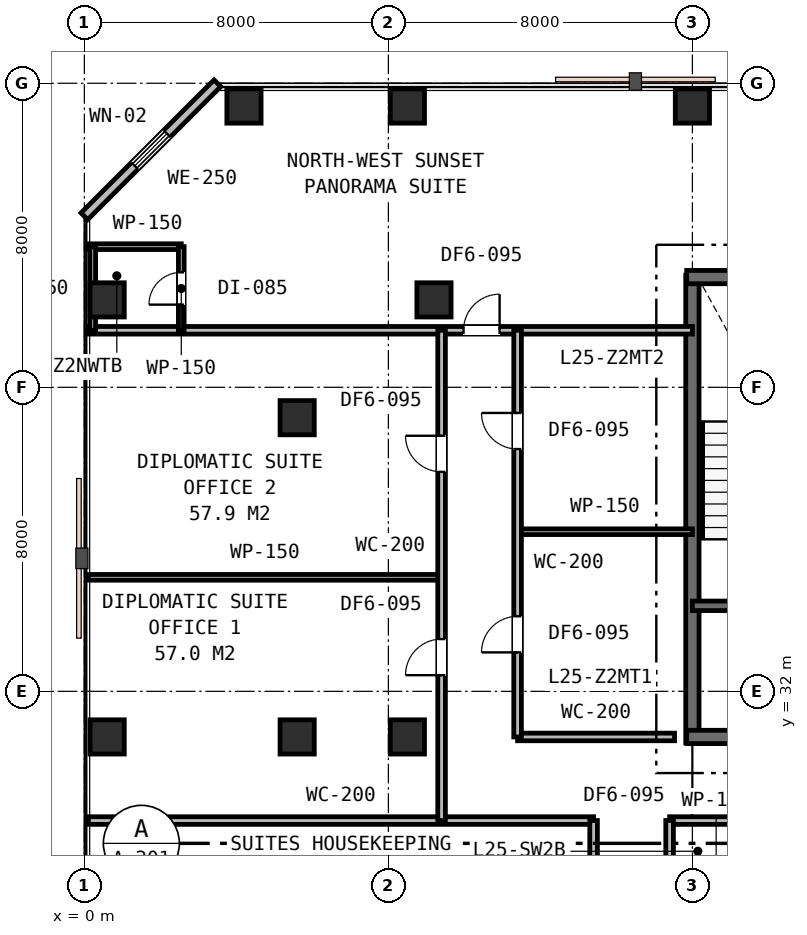
"""IFC4 building model, lengths in metres.
Left out: names, types, materials, properties, quantities, classifications, styles, units other than length and angle.
Written with IfcOpenShell. Run it as: python <this file> out.ifc"""

import sys

from ifc_helpers import new_model, si_unit, direction, frame, frame_2d, origin, origin_2d, place, context, subcontext, project, spatial, rectangle, extrude, element, fill, save


model = new_model("IFC4")
c1 = context("Model", 3, precision=1e-05, world=origin(), true_north=direction((0.0, 1.0)))
c2 = subcontext(c1, "Body", "Model", "MODEL_VIEW")
j1 = project(units=[si_unit("LENGTHUNIT", "METRE"), si_unit("PLANEANGLEUNIT", "RADIAN")], contexts=[c1])
p1 = place(None, origin())
s1 = spatial("IfcSite", under=j1, at=p1, CompositionType="ELEMENT")
p2 = place(p1, origin())
s2 = spatial("IfcBuilding", under=s1, at=p2, CompositionType="ELEMENT")
p3 = place(p2, frame((0.0, 0.0, 100.8)))
s3 = spatial("IfcBuildingStorey", under=s2, at=p3, CompositionType="ELEMENT", Elevation=100.8)
p4 = place(p3, frame((16.0, 30.65, 0.0), z_axis=(0.0, 0.0, 1.0), x_axis=(0.0, 1.0, 0.0)))
e1 = element("IfcWall", 1, at=p4, inside=s3, PredefinedType="SHEAR", context=c2, shape_type="SweptSolid", body=[
    extrude(rectangle(XDim=12.3, YDim=0.35, at=frame_2d((6.15, 0.0))), origin(), (0.0, 0.0, 1.0), 3.6),
])
p5 = place(p3, frame((15.85, 42.9, 0.0), z_axis=(0.0, 0.0, 1.0), x_axis=(1.0, 0.0, 0.0)))
e2 = element("IfcWall", 2, at=p5, inside=s3, PredefinedType="SHEAR", context=c2, shape_type="SweptSolid", body=[
    extrude(rectangle(XDim=24.3, YDim=0.35, at=frame_2d((12.15, 0.0))), origin(), (0.0, 0.0, 1.0), 3.6),
])
p6 = place(p3, frame((15.85, 30.8, 0.0), z_axis=(0.0, 0.0, 1.0), x_axis=(1.0, 0.0, 0.0)))
e3 = element("IfcWall", 3, at=p6, inside=s3, PredefinedType="SHEAR", context=c2, shape_type="SweptSolid", body=[
    extrude(rectangle(XDim=11.2, YDim=0.35, at=frame_2d((5.6, 0.0))), origin(), (0.0, 0.0, 1.0), 3.6),
])
p7 = place(p6, frame((2.45, 0.0, 0.0)))
e4 = element("IfcOpeningElement", 4, at=p7, cuts=e3, PredefinedType="OPENING", context=c2, shape_type="SweptSolid", body=[
    extrude(rectangle(XDim=1.1, YDim=2.15, at=frame_2d((0.55, 1.075))), frame((0.0, 0.185, 0.0), z_axis=(0.0, -1.0, 0.0), x_axis=(1.0, 0.0, 0.0)), (0.0, 0.0, 1.0), 0.37),
])
p8 = place(p3, frame((16.0, 34.25, 0.0), z_axis=(0.0, 0.0, 1.0), x_axis=(1.0, 0.0, 0.0)))
e5 = element("IfcWall", 5, at=p8, inside=s3, PredefinedType="SHEAR", context=c2, shape_type="SweptSolid", body=[
    extrude(rectangle(XDim=6.05, YDim=0.25, at=frame_2d((3.025, 0.0))), origin(), (0.0, 0.0, 1.0), 3.6),
])
p9 = place(p8, frame((1.25, 0.0, 0.0)))
e6 = element("IfcOpeningElement", 6, at=p9, cuts=e5, PredefinedType="OPENING", context=c2, shape_type="SweptSolid", body=[
    extrude(rectangle(XDim=1.0, YDim=2.15, at=frame_2d((0.5, 1.075))), frame((0.0, 0.135, 0.0), z_axis=(0.0, -1.0, 0.0), x_axis=(1.0, 0.0, 0.0)), (0.0, 0.0, 1.0), 0.27),
])
p10 = place(p8, frame((4.2, 0.0, 0.0)))
e7 = element("IfcOpeningElement", 7, at=p10, cuts=e5, PredefinedType="OPENING", context=c2, shape_type="SweptSolid", body=[
    extrude(rectangle(XDim=1.1, YDim=2.15, at=frame_2d((0.55, 1.075))), frame((0.0, 0.135, 0.0), z_axis=(0.0, -1.0, 0.0), x_axis=(1.0, 0.0, 0.0)), (0.0, 0.0, 1.0), 0.27),
])
for number, where, z_axis, x_axis in (
    (8, (5.6, 30.8, 0.0), (0.0, 0.0, 1.0), (1.0, 0.0, 0.0)),
    (9, (5.6, 39.2, 0.0), (0.0, 0.0, 1.0), (1.0, 0.0, 0.0)),
    (10, (8.5, 30.8, 0.0), (0.0, 0.0, 1.0), (1.0, 0.0, 0.0)),
    (11, (9.2, 42.3, 0.0), (0.0, 0.0, 1.0), (1.0, 0.0, 0.0)),
    (12, (0.6, 30.8, 0.0), (0.0, 0.0, 1.0), (1.0, 0.0, 0.0)),
    (13, (0.6, 42.3, 0.0), (0.0, 0.0, 1.0), (1.0, 0.0, 0.0)),
    (14, (4.2, 47.4, 0.0), (0.0, 0.0, 1.0), (1.0, 0.0, 0.0)),
    (15, (8.5, 47.4, 0.0), (0.0, 0.0, 1.0), (1.0, 0.0, 0.0)),
    (16, (16.0, 47.4, 0.0), (0.0, 0.0, 1.0), (1.0, 0.0, 0.0)),
):
    element("IfcColumn", number, at=place(p3, frame(where, z_axis=z_axis, x_axis=x_axis)), inside=s3, PredefinedType="COLUMN", context=c2, shape_type="SweptSolid", body=[
        extrude(rectangle(XDim=0.9, YDim=0.9, at=origin_2d()), origin(), (0.0, 0.0, 1.0), 3.6),
    ])
p11 = place(p3, frame((3.5, 48.0, 0.0), z_axis=(0.0, 0.0, 1.0), x_axis=(-0.707106781187, -0.707106781187, 0.0)))
e17 = element("IfcWall", 17, at=p11, inside=s3, PredefinedType="STANDARD", context=c2, shape_type="SweptSolid", body=[
    extrude(rectangle(XDim=4.95, YDim=0.25, at=frame_2d((2.475, 0.0))), origin(), (0.0, 0.0, 1.0), 3.33),
])
p12 = place(p11, frame((1.875, 0.0, 0.85)))
e18 = element("IfcOpeningElement", 18, at=p12, cuts=e17, PredefinedType="OPENING", context=c2, shape_type="SweptSolid", body=[
    extrude(rectangle(XDim=1.2, YDim=1.6, at=frame_2d((0.6, 0.8))), frame((0.0, 0.135, 0.0), z_axis=(0.0, -1.0, 0.0), x_axis=(1.0, 0.0, 0.0)), (0.0, 0.0, 1.0), 0.27),
])
p13 = place(p3, frame((0.1, 28.6, 0.0), z_axis=(0.0, 0.0, 1.0), x_axis=(1.0, 0.0, 0.0)))
e19 = element("IfcWall", 19, at=p13, inside=s3, PredefinedType="PARTITIONING", context=c2, shape_type="SweptSolid", body=[
    extrude(rectangle(XDim=13.3, YDim=0.2, at=frame_2d((6.65, 0.0))), origin(), (0.0, 0.0, 1.0), 2.87),
])
p14 = place(p3, frame((15.4, 28.6, 0.0), z_axis=(0.0, 0.0, 1.0), x_axis=(1.0, 0.0, 0.0)))
e20 = element("IfcWall", 20, at=p14, inside=s3, PredefinedType="PARTITIONING", context=c2, shape_type="SweptSolid", body=[
    extrude(rectangle(XDim=28.8, YDim=0.2, at=frame_2d((14.4, 0.0))), origin(), (0.0, 0.0, 1.0), 2.87),
])
p15 = place(p14, frame((12.41, 0.0, 0.0)))
e21 = element("IfcOpeningElement", 21, at=p15, cuts=e20, PredefinedType="OPENING", context=c2, shape_type="SweptSolid", body=[
    extrude(rectangle(XDim=0.95, YDim=2.15, at=frame_2d((0.475, 1.075))), frame((0.0, 0.11, 0.0), z_axis=(0.0, -1.0, 0.0), x_axis=(1.0, 0.0, 0.0)), (0.0, 0.0, 1.0), 0.22),
])
p16 = place(p14, frame((22.68, 0.0, 0.0)))
e22 = element("IfcOpeningElement", 22, at=p16, cuts=e20, PredefinedType="OPENING", context=c2, shape_type="SweptSolid", body=[
    extrude(rectangle(XDim=0.95, YDim=2.15, at=frame_2d((0.475, 1.075))), frame((0.0, 0.11, 0.0), z_axis=(0.0, -1.0, 0.0), x_axis=(1.0, 0.0, 0.0)), (0.0, 0.0, 1.0), 0.22),
])
p17 = place(p3, frame((11.4, 30.8, 0.0), z_axis=(0.0, 0.0, 1.0), x_axis=(1.0, 0.0, 0.0)))
e23 = element("IfcWall", 23, at=p17, inside=s3, PredefinedType="PARTITIONING", context=c2, shape_type="SweptSolid", body=[
    extrude(rectangle(XDim=4.13, YDim=0.2, at=frame_2d((2.065, 0.0))), origin(), (0.0, 0.0, 1.0), 2.87),
])
p18 = place(p3, frame((13.4, 10.6, 0.0), z_axis=(0.0, 0.0, 1.0), x_axis=(0.0, 1.0, 0.0)))
e24 = element("IfcWall", 24, at=p18, inside=s3, PredefinedType="PARTITIONING", context=c2, shape_type="SweptSolid", body=[
    extrude(rectangle(XDim=18.0, YDim=0.2, at=frame_2d((9.0, 0.0))), origin(), (0.0, 0.0, 1.0), 2.87),
])
p19 = place(p18, frame((8.425, 0.0, 0.0)))
e25 = element("IfcOpeningElement", 25, at=p19, cuts=e24, PredefinedType="OPENING", context=c2, shape_type="SweptSolid", body=[
    extrude(rectangle(XDim=0.95, YDim=2.15, at=frame_2d((0.475, 1.075))), frame((0.0, 0.11, 0.0), z_axis=(0.0, -1.0, 0.0), x_axis=(1.0, 0.0, 0.0)), (0.0, 0.0, 1.0), 0.22),
])
p20 = place(p18, frame((15.399, 0.0, 0.0)))
e26 = element("IfcOpeningElement", 26, at=p20, cuts=e24, PredefinedType="OPENING", context=c2, shape_type="SweptSolid", body=[
    extrude(rectangle(XDim=0.95, YDim=2.15, at=frame_2d((0.475, 1.075))), frame((0.0, 0.11, 0.0), z_axis=(0.0, -1.0, 0.0), x_axis=(1.0, 0.0, 0.0)), (0.0, 0.0, 1.0), 0.22),
])
p21 = place(p18, frame((3.225, 0.0, 0.0)))
e27 = element("IfcOpeningElement", 27, at=p21, cuts=e24, PredefinedType="OPENING", context=c2, shape_type="SweptSolid", body=[
    extrude(rectangle(XDim=0.95, YDim=2.15, at=frame_2d((0.475, 1.075))), frame((0.0, 0.11, 0.0), z_axis=(0.0, -1.0, 0.0), x_axis=(1.0, 0.0, 0.0)), (0.0, 0.0, 1.0), 0.22),
])
p22 = place(p3, frame((0.1, 41.5, 0.0), z_axis=(0.0, 0.0, 1.0), x_axis=(1.0, 0.0, 0.0)))
e28 = element("IfcWall", 28, at=p22, inside=s3, PredefinedType="PARTITIONING", context=c2, shape_type="SweptSolid", body=[
    extrude(rectangle(XDim=15.9, YDim=0.2, at=frame_2d((7.95, 0.0))), origin(), (0.0, 0.0, 1.0), 2.87),
])
p23 = place(p22, frame((9.877, 0.0, 0.0)))
e29 = element("IfcOpeningElement", 29, at=p23, cuts=e28, PredefinedType="OPENING", context=c2, shape_type="SweptSolid", body=[
    extrude(rectangle(XDim=0.95, YDim=2.15, at=frame_2d((0.475, 1.075))), frame((0.0, 0.11, 0.0), z_axis=(0.0, -1.0, 0.0), x_axis=(1.0, 0.0, 0.0)), (0.0, 0.0, 1.0), 0.22),
])
p24 = place(p3, frame((0.1, 43.7, 0.0), z_axis=(0.0, 0.0, 1.0), x_axis=(1.0, 0.0, 0.0)))
e30 = element("IfcWall", 30, at=p24, inside=s3, PredefinedType="PARTITIONING", context=c2, shape_type="SweptSolid", body=[
    extrude(rectangle(XDim=2.45, YDim=0.15, at=frame_2d((1.225, 0.0))), origin(), (0.0, 0.0, 1.0), 3.33),
])
p25 = place(p3, frame((2.55, 41.5, 0.0), z_axis=(0.0, 0.0, 1.0), x_axis=(0.0, 1.0, 0.0)))
e31 = element("IfcWall", 31, at=p25, inside=s3, PredefinedType="PARTITIONING", context=c2, shape_type="SweptSolid", body=[
    extrude(rectangle(XDim=2.2, YDim=0.15, at=frame_2d((1.1, 0.0))), origin(), (0.0, 0.0, 1.0), 2.87),
])
p26 = place(p25, frame((0.675, 0.0, 0.0)))
e32 = element("IfcOpeningElement", 32, at=p26, cuts=e31, PredefinedType="OPENING", context=c2, shape_type="SweptSolid", body=[
    extrude(rectangle(XDim=0.85, YDim=2.15, at=frame_2d((0.425, 1.075))), frame((0.0, 0.085, 0.0), z_axis=(0.0, -1.0, 0.0), x_axis=(1.0, 0.0, 0.0)), (0.0, 0.0, 1.0), 0.17),
])
p27 = place(p3, frame((0.22, 41.5, 0.0), z_axis=(0.0, 0.0, 1.0), x_axis=(0.0, 1.0, 0.0)))
e33 = element("IfcWall", 33, at=p27, inside=s3, PredefinedType="PARTITIONING", context=c2, shape_type="SweptSolid", body=[
    extrude(rectangle(XDim=2.2, YDim=0.15, at=frame_2d((1.1, 0.0))), origin(), (0.0, 0.0, 1.0), 2.87),
])
p28 = place(p3, frame((0.1, 35.0, 0.0), z_axis=(0.0, 0.0, 1.0), x_axis=(1.0, 0.0, 0.0)))
e34 = element("IfcWall", 34, at=p28, inside=s3, PredefinedType="PARTITIONING", context=c2, shape_type="SweptSolid", body=[
    extrude(rectangle(XDim=9.3, YDim=0.15, at=frame_2d((4.65, 0.0))), origin(), (0.0, 0.0, 1.0), 2.87),
])
p29 = place(p3, frame((11.4, 36.2, 0.0), z_axis=(0.0, 0.0, 1.0), x_axis=(1.0, 0.0, 0.0)))
e35 = element("IfcWall", 35, at=p29, inside=s3, PredefinedType="PARTITIONING", context=c2, shape_type="SweptSolid", body=[
    extrude(rectangle(XDim=4.6, YDim=0.15, at=frame_2d((2.3, 0.0))), origin(), (0.0, 0.0, 1.0), 3.33),
])
p30 = place(p3, frame((9.4, 28.6, 0.0), z_axis=(0.0, 0.0, 1.0), x_axis=(0.0, 1.0, 0.0)))
e36 = element("IfcWall", 36, at=p30, inside=s3, PredefinedType="PARTITIONING", context=c2, shape_type="SweptSolid", body=[
    extrude(rectangle(XDim=12.9, YDim=0.2, at=frame_2d((6.45, 0.0))), origin(), (0.0, 0.0, 1.0), 2.87),
])
p31 = place(p30, frame((3.825, 0.0, 0.0)))
e37 = element("IfcOpeningElement", 37, at=p31, cuts=e36, PredefinedType="OPENING", context=c2, shape_type="SweptSolid", body=[
    extrude(rectangle(XDim=0.95, YDim=2.15, at=frame_2d((0.475, 1.075))), frame((0.0, 0.11, 0.0), z_axis=(0.0, -1.0, 0.0), x_axis=(1.0, 0.0, 0.0)), (0.0, 0.0, 1.0), 0.22),
])
p32 = place(p30, frame((9.175, 0.0, 0.0)))
e38 = element("IfcOpeningElement", 38, at=p32, cuts=e36, PredefinedType="OPENING", context=c2, shape_type="SweptSolid", body=[
    extrude(rectangle(XDim=0.95, YDim=2.15, at=frame_2d((0.475, 1.075))), frame((0.0, 0.11, 0.0), z_axis=(0.0, -1.0, 0.0), x_axis=(1.0, 0.0, 0.0)), (0.0, 0.0, 1.0), 0.22),
])
p33 = place(p3, frame((11.4, 30.8, 0.0), z_axis=(0.0, 0.0, 1.0), x_axis=(0.0, 1.0, 0.0)))
e39 = element("IfcWall", 39, at=p33, inside=s3, PredefinedType="PARTITIONING", context=c2, shape_type="SweptSolid", body=[
    extrude(rectangle(XDim=10.7, YDim=0.2, at=frame_2d((5.35, 0.0))), origin(), (0.0, 0.0, 1.0), 2.87),
])
p34 = place(p33, frame((2.225, 0.0, 0.0)))
e40 = element("IfcOpeningElement", 40, at=p34, cuts=e39, PredefinedType="OPENING", context=c2, shape_type="SweptSolid", body=[
    extrude(rectangle(XDim=0.95, YDim=2.15, at=frame_2d((0.475, 1.075))), frame((0.0, 0.11, 0.0), z_axis=(0.0, -1.0, 0.0), x_axis=(1.0, 0.0, 0.0)), (0.0, 0.0, 1.0), 0.22),
])
p35 = place(p33, frame((7.575, 0.0, 0.0)))
e41 = element("IfcOpeningElement", 41, at=p35, cuts=e39, PredefinedType="OPENING", context=c2, shape_type="SweptSolid", body=[
    extrude(rectangle(XDim=0.95, YDim=2.15, at=frame_2d((0.475, 1.075))), frame((0.0, 0.11, 0.0), z_axis=(0.0, -1.0, 0.0), x_axis=(1.0, 0.0, 0.0)), (0.0, 0.0, 1.0), 0.22),
])
p36 = place(p3, frame((15.4, 10.6, 0.0), z_axis=(0.0, 0.0, 1.0), x_axis=(0.0, 1.0, 0.0)))
e42 = element("IfcWall", 42, at=p36, inside=s3, PredefinedType="PARTITIONING", context=c2, shape_type="SweptSolid", body=[
    extrude(rectangle(XDim=18.0, YDim=0.2, at=frame_2d((9.0, 0.0))), origin(), (0.0, 0.0, 1.0), 2.87),
])
p37 = place(p36, frame((4.24, 0.0, 0.0)))
e43 = element("IfcOpeningElement", 43, at=p37, cuts=e42, PredefinedType="OPENING", context=c2, shape_type="SweptSolid", body=[
    extrude(rectangle(XDim=0.95, YDim=2.15, at=frame_2d((0.475, 1.075))), frame((0.0, 0.11, 0.0), z_axis=(0.0, -1.0, 0.0), x_axis=(1.0, 0.0, 0.0)), (0.0, 0.0, 1.0), 0.22),
])
p38 = place(p36, frame((11.494, 0.0, 0.0)))
e44 = element("IfcOpeningElement", 44, at=p38, cuts=e42, PredefinedType="OPENING", context=c2, shape_type="SweptSolid", body=[
    extrude(rectangle(XDim=0.95, YDim=2.15, at=frame_2d((0.475, 1.075))), frame((0.0, 0.11, 0.0), z_axis=(0.0, -1.0, 0.0), x_axis=(1.0, 0.0, 0.0)), (0.0, 0.0, 1.0), 0.22),
])
p39 = place(p12, origin())
e45 = element("IfcWindow", 45, at=p39, inside=s3, PartitioningType="SINGLE_PANEL", PredefinedType="WINDOW", context=c2, shape_type="SweptSolid", body=[
    extrude(rectangle(XDim=1.2, YDim=1.6, at=frame_2d((0.6, 0.8))), frame((0.0, 0.03, 0.0), z_axis=(0.0, -1.0, 0.0), x_axis=(1.0, 0.0, 0.0)), (0.0, 0.0, 1.0), 0.06),
])
fill(e18, e45)
p40 = place(p23, origin())
e46 = element("IfcDoor", 46, at=p40, inside=s3, OperationType="SINGLE_SWING_RIGHT", PredefinedType="DOOR", context=c2, shape_type="SweptSolid", body=[
    extrude(rectangle(XDim=0.95, YDim=2.15, at=frame_2d((0.475, 1.075))), frame((0.0, 0.025, 0.0), z_axis=(0.0, -1.0, 0.0), x_axis=(1.0, 0.0, 0.0)), (0.0, 0.0, 1.0), 0.05),
])
fill(e29, e46)
p41 = place(p26, origin())
e47 = element("IfcDoor", 47, at=p41, inside=s3, OperationType="SINGLE_SWING_LEFT", PredefinedType="DOOR", context=c2, shape_type="SweptSolid", body=[
    extrude(rectangle(XDim=0.85, YDim=2.15, at=frame_2d((0.425, 1.075))), frame((0.0, 0.025, 0.0), z_axis=(0.0, -1.0, 0.0), x_axis=(1.0, 0.0, 0.0)), (0.0, 0.0, 1.0), 0.05),
])
fill(e32, e47)
p42 = place(p31, origin())
e48 = element("IfcDoor", 48, at=p42, inside=s3, OperationType="SINGLE_SWING_LEFT", PredefinedType="DOOR", context=c2, shape_type="SweptSolid", body=[
    extrude(rectangle(XDim=0.95, YDim=2.15, at=frame_2d((0.475, 1.075))), frame((0.0, 0.025, 0.0), z_axis=(0.0, -1.0, 0.0), x_axis=(1.0, 0.0, 0.0)), (0.0, 0.0, 1.0), 0.05),
])
fill(e37, e48)
p43 = place(p32, origin())
e49 = element("IfcDoor", 49, at=p43, inside=s3, OperationType="SINGLE_SWING_RIGHT", PredefinedType="DOOR", context=c2, shape_type="SweptSolid", body=[
    extrude(rectangle(XDim=0.95, YDim=2.15, at=frame_2d((0.475, 1.075))), frame((0.0, 0.025, 0.0), z_axis=(0.0, -1.0, 0.0), x_axis=(1.0, 0.0, 0.0)), (0.0, 0.0, 1.0), 0.05),
])
fill(e38, e49)
p44 = place(p34, origin())
e50 = element("IfcDoor", 50, at=p44, inside=s3, OperationType="SINGLE_SWING_LEFT", PredefinedType="DOOR", context=c2, shape_type="SweptSolid", body=[
    extrude(rectangle(XDim=0.95, YDim=2.15, at=frame_2d((0.475, 1.075))), frame((0.0, 0.025, 0.0), z_axis=(0.0, -1.0, 0.0), x_axis=(1.0, 0.0, 0.0)), (0.0, 0.0, 1.0), 0.05),
])
fill(e40, e50)
p45 = place(p35, origin())
e51 = element("IfcDoor", 51, at=p45, inside=s3, OperationType="SINGLE_SWING_RIGHT", PredefinedType="DOOR", context=c2, shape_type="SweptSolid", body=[
    extrude(rectangle(XDim=0.95, YDim=2.15, at=frame_2d((0.475, 1.075))), frame((0.0, 0.025, 0.0), z_axis=(0.0, -1.0, 0.0), x_axis=(1.0, 0.0, 0.0)), (0.0, 0.0, 1.0), 0.05),
])
fill(e41, e51)
save(model, sys.argv[1])
